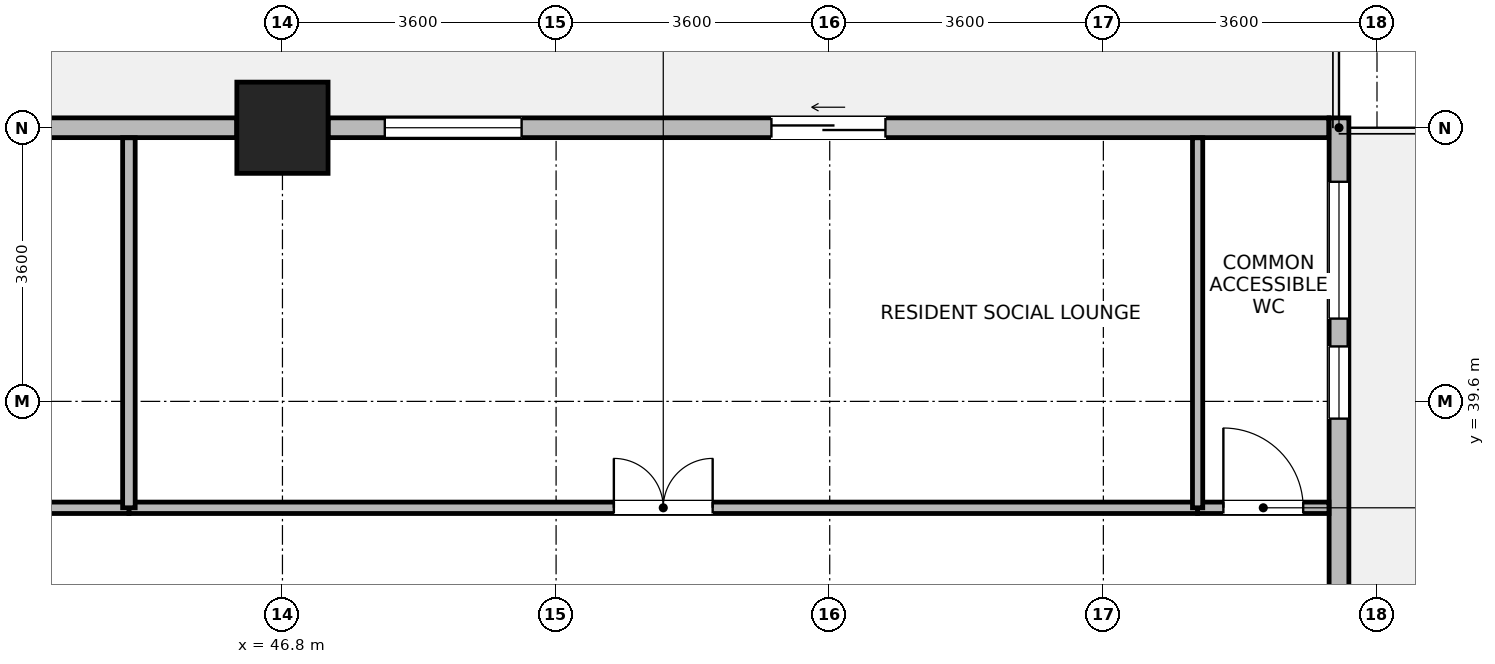
"""IFC4 building model, lengths in metres.
Left out: names, types, materials, properties, quantities, classifications, styles, units other than length and angle.
Written with IfcOpenShell. Run it as: python <this file> out.ifc"""

import sys

from ifc_helpers import new_model, si_unit, direction, frame, frame_2d, origin, origin_2d, place, context, subcontext, project, spatial, rectangle, extrude, source, transform, mapped, element, fill, save


model = new_model("IFC4")
c1 = context("Model", 3, precision=1e-05, world=origin(), true_north=direction((0.0, 1.0)))
c2 = subcontext(c1, "Body", "Model", "MODEL_VIEW")
j1 = project(units=[si_unit("LENGTHUNIT", "METRE"), si_unit("PLANEANGLEUNIT", "RADIAN")], contexts=[c1])
p1 = place(None, origin())
s1 = spatial("IfcSite", under=j1, at=p1, CompositionType="ELEMENT")
p2 = place(p1, origin())
s2 = spatial("IfcBuilding", under=s1, at=p2, CompositionType="ELEMENT")
p3 = place(p2, frame((0.0, 0.0, 97.1)))
s3 = spatial("IfcBuildingStorey", under=s2, at=p3, CompositionType="ELEMENT", Elevation=97.1)
m1 = source(origin(), c2, "Body", "SweptSolid", [
    extrude(rectangle(XDim=1.2, YDim=1.2, at=origin_2d()), origin(), (0.0, 0.0, 1.0), 3.7),
])
p4 = place(p3, frame((46.8, 43.2, 0.0), z_axis=(0.0, 0.0, 1.0), x_axis=(1.0, 0.0, 0.0)))
e1 = element("IfcColumn", 1, at=p4, inside=s3, PredefinedType="COLUMN", context=c2, shape_type="MappedRepresentation", body=[
    mapped(m1, transform((0.0, 0.0, 0.0), x_axis=(1.0, 0.0, 0.0), y_axis=(0.0, 1.0, 0.0), z_axis=(0.0, 0.0, 1.0), scale=1.0)),
])
p5 = place(p3, frame((60.7, 43.33, 0.0), z_axis=(0.0, 0.0, 1.0), x_axis=(0.0, -1.0, 0.0)))
e2 = element("IfcWall", 2, at=p5, inside=s3, PredefinedType="STANDARD", context=c2, shape_type="SweptSolid", body=[
    extrude(rectangle(XDim=6.964, YDim=0.26, at=frame_2d((3.482, 0.0))), origin(), (0.0, 0.0, 1.0), 3.43),
])
p6 = place(p5, frame((0.841, 0.0, 0.85)))
e3 = element("IfcOpeningElement", 3, at=p6, cuts=e2, PredefinedType="OPENING", context=c2, shape_type="SweptSolid", body=[
    extrude(rectangle(XDim=1.8, YDim=1.85, at=frame_2d((0.9, 0.925))), frame((0.0, 0.14, 0.0), z_axis=(0.0, -1.0, 0.0), x_axis=(1.0, 0.0, 0.0)), (0.0, 0.0, 1.0), 0.28),
])
p7 = place(p5, frame((3.007, 0.0, 0.85)))
e4 = element("IfcOpeningElement", 4, at=p7, cuts=e2, PredefinedType="OPENING", context=c2, shape_type="SweptSolid", body=[
    extrude(rectangle(XDim=0.95, YDim=1.75, at=frame_2d((0.475, 0.875))), frame((0.0, 0.14, 0.0), z_axis=(0.0, -1.0, 0.0), x_axis=(1.0, 0.0, 0.0)), (0.0, 0.0, 1.0), 0.28),
])
p8 = place(p3, frame((47.401, 43.2, 0.0), z_axis=(0.0, 0.0, 1.0), x_axis=(1.0, 0.0, 0.0)))
e5 = element("IfcWall", 5, at=p8, inside=s3, PredefinedType="STANDARD", context=c2, shape_type="SweptSolid", body=[
    extrude(rectangle(XDim=13.164, YDim=0.26, at=frame_2d((6.582, 0.0))), origin(), (0.0, 0.0, 1.0), 3.43),
])
p9 = place(p8, frame((5.832, 0.0, 0.0)))
e6 = element("IfcOpeningElement", 6, at=p9, cuts=e5, PredefinedType="OPENING", context=c2, shape_type="SweptSolid", body=[
    extrude(rectangle(XDim=1.5, YDim=2.15, at=frame_2d((0.75, 1.075))), frame((0.0, 0.14, 0.0), z_axis=(0.0, -1.0, 0.0), x_axis=(1.0, 0.0, 0.0)), (0.0, 0.0, 1.0), 0.28),
])
p10 = place(p8, frame((0.746, 0.0, 0.85)))
e7 = element("IfcOpeningElement", 7, at=p10, cuts=e5, PredefinedType="OPENING", context=c2, shape_type="SweptSolid", body=[
    extrude(rectangle(XDim=1.8, YDim=1.85, at=frame_2d((0.9, 0.925))), frame((0.0, 0.14, 0.0), z_axis=(0.0, -1.0, 0.0), x_axis=(1.0, 0.0, 0.0)), (0.0, 0.0, 1.0), 0.28),
])
p11 = place(p3, frame((36.601, 43.2, 0.0), z_axis=(0.0, 0.0, 1.0), x_axis=(1.0, 0.0, 0.0)))
e8 = element("IfcWall", 8, at=p11, inside=s3, PredefinedType="STANDARD", context=c2, shape_type="SweptSolid", body=[
    extrude(rectangle(XDim=9.598, YDim=0.26, at=frame_2d((4.799, 0.0))), origin(), (0.0, 0.0, 1.0), 2.98),
])
p12 = place(p11, frame((0.7, 0.0, 0.85)))
e9 = element("IfcOpeningElement", 9, at=p12, cuts=e8, PredefinedType="OPENING", context=c2, shape_type="SweptSolid", body=[
    extrude(rectangle(XDim=1.8, YDim=1.85, at=frame_2d((0.9, 0.925))), frame((0.0, 0.14, 0.0), z_axis=(0.0, -1.0, 0.0), x_axis=(1.0, 0.0, 0.0)), (0.0, 0.0, 1.0), 0.28),
])
p13 = place(p11, frame((3.899, 0.0, 0.85)))
e10 = element("IfcOpeningElement", 10, at=p13, cuts=e8, PredefinedType="OPENING", context=c2, shape_type="SweptSolid", body=[
    extrude(rectangle(XDim=1.8, YDim=1.85, at=frame_2d((0.9, 0.925))), frame((0.0, 0.14, 0.0), z_axis=(0.0, -1.0, 0.0), x_axis=(1.0, 0.0, 0.0)), (0.0, 0.0, 1.0), 0.28),
])
p14 = place(p3, frame((44.78, 38.2, 0.0), z_axis=(0.0, 0.0, 1.0), x_axis=(1.0, 0.0, 0.0)))
e11 = element("IfcWall", 11, at=p14, inside=s3, PredefinedType="PARTITIONING", context=c2, shape_type="SweptSolid", body=[
    extrude(rectangle(XDim=14.06, YDim=0.15, at=frame_2d((7.03, 0.0))), origin(), (0.0, 0.0, 1.0), 3.43),
])
p15 = place(p14, frame((6.38, 0.0, 0.0)))
e12 = element("IfcOpeningElement", 12, at=p15, cuts=e11, PredefinedType="OPENING", context=c2, shape_type="SweptSolid", body=[
    extrude(rectangle(XDim=1.3, YDim=2.12, at=frame_2d((0.65, 1.06))), frame((0.0, 0.085, 0.0), z_axis=(0.0, -1.0, 0.0), x_axis=(1.0, 0.0, 0.0)), (0.0, 0.0, 1.0), 0.17),
])
p16 = place(p3, frame((32.62, 38.2, 0.0), z_axis=(0.0, 0.0, 1.0), x_axis=(1.0, 0.0, 0.0)))
e13 = element("IfcWall", 13, at=p16, inside=s3, PredefinedType="PARTITIONING", context=c2, shape_type="SweptSolid", body=[
    extrude(rectangle(XDim=12.16, YDim=0.15, at=frame_2d((6.08, 0.0))), origin(), (0.0, 0.0, 1.0), 3.43),
])
p17 = place(p16, frame((5.63, 0.0, 0.0)))
e14 = element("IfcOpeningElement", 14, at=p17, cuts=e13, PredefinedType="OPENING", context=c2, shape_type="SweptSolid", body=[
    extrude(rectangle(XDim=0.9, YDim=2.08, at=frame_2d((0.45, 1.04))), frame((0.0, 0.085, 0.0), z_axis=(0.0, -1.0, 0.0), x_axis=(1.0, 0.0, 0.0)), (0.0, 0.0, 1.0), 0.17),
])
p18 = place(p3, frame((58.84, 38.2, 0.0), z_axis=(0.0, 0.0, 1.0), x_axis=(1.0, 0.0, 0.0)))
e15 = element("IfcWall", 15, at=p18, inside=s3, PredefinedType="PARTITIONING", context=c2, shape_type="SweptSolid", body=[
    extrude(rectangle(XDim=1.728, YDim=0.15, at=frame_2d((0.864, 0.0))), origin(), (0.0, 0.0, 1.0), 3.43),
])
p19 = place(p18, frame((0.339, 0.0, 0.0)))
e16 = element("IfcOpeningElement", 16, at=p19, cuts=e15, PredefinedType="OPENING", context=c2, shape_type="SweptSolid", body=[
    extrude(rectangle(XDim=1.05, YDim=2.12, at=frame_2d((0.525, 1.06))), frame((0.0, 0.085, 0.0), z_axis=(0.0, -1.0, 0.0), x_axis=(1.0, 0.0, 0.0)), (0.0, 0.0, 1.0), 0.17),
])
p20 = place(p3, frame((44.78, 38.2, 0.0), z_axis=(0.0, 0.0, 1.0), x_axis=(0.0, 1.0, 0.0)))
e17 = element("IfcWall", 17, at=p20, inside=s3, PredefinedType="PARTITIONING", context=c2, shape_type="SweptSolid", body=[
    extrude(rectangle(XDim=4.868, YDim=0.165, at=frame_2d((2.434, 0.0))), origin(), (0.0, 0.0, 1.0), 3.43),
])
p21 = place(p3, frame((58.84, 38.2, 0.0), z_axis=(0.0, 0.0, 1.0), x_axis=(0.0, 1.0, 0.0)))
e18 = element("IfcWall", 18, at=p21, inside=s3, PredefinedType="PARTITIONING", context=c2, shape_type="SweptSolid", body=[
    extrude(rectangle(XDim=4.868, YDim=0.135, at=frame_2d((2.434, 0.0))), origin(), (0.0, 0.0, 1.0), 3.43),
])
p22 = place(p6, origin())
e19 = element("IfcWindow", 19, at=p22, inside=s3, PartitioningType="SINGLE_PANEL", PredefinedType="WINDOW", context=c2, shape_type="SweptSolid", body=[
    extrude(rectangle(XDim=1.8, YDim=1.85, at=frame_2d((0.9, 0.925))), frame((0.0, 0.03, 0.0), z_axis=(0.0, -1.0, 0.0), x_axis=(1.0, 0.0, 0.0)), (0.0, 0.0, 1.0), 0.06),
])
fill(e3, e19)
p23 = place(p7, origin())
e20 = element("IfcWindow", 20, at=p23, inside=s3, PartitioningType="SINGLE_PANEL", PredefinedType="WINDOW", context=c2, shape_type="SweptSolid", body=[
    extrude(rectangle(XDim=0.95, YDim=1.75, at=frame_2d((0.475, 0.875))), frame((0.0, 0.03, 0.0), z_axis=(0.0, -1.0, 0.0), x_axis=(1.0, 0.0, 0.0)), (0.0, 0.0, 1.0), 0.06),
])
fill(e4, e20)
p24 = place(p9, origin())
e21 = element("IfcDoor", 21, at=p24, inside=s3, OperationType="SLIDING_TO_LEFT", PredefinedType="DOOR", context=c2, shape_type="SweptSolid", body=[
    extrude(rectangle(XDim=1.5, YDim=2.15, at=frame_2d((0.75, 1.075))), frame((0.0, 0.025, 0.0), z_axis=(0.0, -1.0, 0.0), x_axis=(1.0, 0.0, 0.0)), (0.0, 0.0, 1.0), 0.05),
])
fill(e6, e21)
p25 = place(p10, origin())
e22 = element("IfcWindow", 22, at=p25, inside=s3, PartitioningType="SINGLE_PANEL", PredefinedType="WINDOW", context=c2, shape_type="SweptSolid", body=[
    extrude(rectangle(XDim=1.8, YDim=1.85, at=frame_2d((0.9, 0.925))), frame((0.0, 0.03, 0.0), z_axis=(0.0, -1.0, 0.0), x_axis=(1.0, 0.0, 0.0)), (0.0, 0.0, 1.0), 0.06),
])
fill(e7, e22)
p26 = place(p15, origin())
e23 = element("IfcDoor", 23, at=p26, inside=s3, OperationType="DOUBLE_DOOR_SINGLE_SWING", PredefinedType="DOOR", context=c2, shape_type="SweptSolid", body=[
    extrude(rectangle(XDim=1.3, YDim=2.12, at=frame_2d((0.65, 1.06))), frame((0.0, 0.025, 0.0), z_axis=(0.0, -1.0, 0.0), x_axis=(1.0, 0.0, 0.0)), (0.0, 0.0, 1.0), 0.05),
])
fill(e12, e23)
p27 = place(p19, origin())
e24 = element("IfcDoor", 24, at=p27, inside=s3, OperationType="SINGLE_SWING_LEFT", PredefinedType="DOOR", context=c2, shape_type="SweptSolid", body=[
    extrude(rectangle(XDim=1.05, YDim=2.12, at=frame_2d((0.525, 1.06))), frame((0.0, 0.025, 0.0), z_axis=(0.0, -1.0, 0.0), x_axis=(1.0, 0.0, 0.0)), (0.0, 0.0, 1.0), 0.05),
])
fill(e16, e24)
save(model, sys.argv[1])
